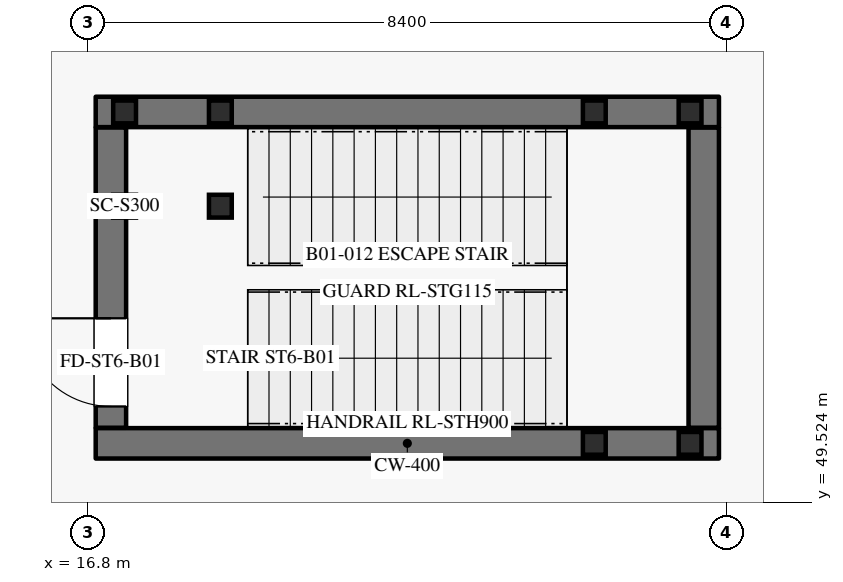
"""IFC4 building model, lengths in metres.
Left out: names, types, materials, properties, quantities, classifications, styles, units other than length and angle.
Written with IfcOpenShell. Run it as: python <this file> out.ifc"""

import sys

from ifc_helpers import new_model, si_unit, direction, frame, frame_2d, origin, origin_2d, place, context, subcontext, project, spatial, rectangle, hollow_rectangle, extrude, element, fill, save


model = new_model("IFC4")
c1 = context("Model", 3, precision=1e-05, world=origin(), true_north=direction((0.0, 1.0)))
c2 = subcontext(c1, "Body", "Model", "MODEL_VIEW")
j1 = project(units=[si_unit("LENGTHUNIT", "METRE"), si_unit("PLANEANGLEUNIT", "RADIAN")], contexts=[c1])
p1 = place(None, origin())
s1 = spatial("IfcSite", under=j1, at=p1, CompositionType="ELEMENT")
p2 = place(p1, origin())
s2 = spatial("IfcBuilding", under=s1, at=p2, CompositionType="ELEMENT")
p3 = place(p2, frame((0.0, 0.0, -5.4)))
s3 = spatial("IfcBuildingStorey", under=s2, at=p3, CompositionType="ELEMENT", Elevation=-5.4)
p4 = place(p3, frame((16.9, 50.3, 0.0), z_axis=(0.0, 0.0, 1.0), x_axis=(1.0, 0.0, 0.0)))
e1 = element("IfcWall", 1, at=p4, inside=s3, PredefinedType="SHEAR", context=c2, shape_type="SweptSolid", body=[
    extrude(rectangle(XDim=8.2, YDim=0.4, at=frame_2d((4.1, 0.0))), origin(), (0.0, 0.0, 1.0), 4.995),
])
p5 = place(p3, frame((24.9, 50.505, 0.0), z_axis=(0.0, 0.0, 1.0), x_axis=(0.0, 1.0, 0.0)))
e2 = element("IfcWall", 2, at=p5, inside=s3, PredefinedType="SHEAR", context=c2, shape_type="SweptSolid", body=[
    extrude(rectangle(XDim=3.95, YDim=0.4, at=frame_2d((1.975, 0.0))), origin(), (0.0, 0.0, 1.0), 4.995),
])
p6 = place(p3, frame((16.9, 54.66, 0.0), z_axis=(0.0, 0.0, 1.0), x_axis=(1.0, 0.0, 0.0)))
e3 = element("IfcWall", 3, at=p6, inside=s3, PredefinedType="SHEAR", context=c2, shape_type="SweptSolid", body=[
    extrude(rectangle(XDim=8.2, YDim=0.4, at=frame_2d((4.1, 0.0))), origin(), (0.0, 0.0, 1.0), 4.995),
])
p7 = place(p3, frame((17.1, 50.505, 0.0), z_axis=(0.0, 0.0, 1.0), x_axis=(0.0, 1.0, 0.0)))
e4 = element("IfcWall", 4, at=p7, inside=s3, PredefinedType="SHEAR", context=c2, shape_type="SweptSolid", body=[
    extrude(rectangle(XDim=3.95, YDim=0.4, at=frame_2d((1.975, 0.0))), origin(), (0.0, 0.0, 1.0), 4.995),
])
p8 = place(p7, frame((0.28, 0.0, 0.0)))
e5 = element("IfcOpeningElement", 5, at=p8, cuts=e4, PredefinedType="OPENING", context=c2, shape_type="SweptSolid", body=[
    extrude(rectangle(XDim=1.16, YDim=2.2, at=frame_2d((0.58, 1.1))), frame((0.0, 0.21, 0.0), z_axis=(0.0, -1.0, 0.0), x_axis=(1.0, 0.0, 0.0)), (0.0, 0.0, 1.0), 0.42),
])
for number, where, z_axis, x_axis in (
    (6, (17.28, 53.42, 0.0), (0.0, 0.0, 1.0), (1.0, 0.0, 0.0)),
    (7, (17.28, 54.66, 0.0), (0.0, 0.0, 1.0), (1.0, 0.0, 0.0)),
    (8, (18.54, 53.42, 0.0), (0.0, 0.0, 1.0), (1.0, 0.0, 0.0)),
    (9, (18.54, 54.66, 0.0), (0.0, 0.0, 1.0), (1.0, 0.0, 0.0)),
):
    element("IfcColumn", number, at=place(p3, frame(where, z_axis=z_axis, x_axis=x_axis)), inside=s3, PredefinedType="COLUMN", context=c2, shape_type="SweptSolid", body=[
        extrude(hollow_rectangle(XDim=0.3, YDim=0.3, WallThickness=0.012, at=origin_2d()), origin(), (0.0, 0.0, 1.0), 5.22),
    ])
for number, where, z_axis, x_axis in (
    (10, (23.46, 50.3, 0.0), (0.0, 0.0, 1.0), (1.0, 0.0, 0.0)),
    (11, (23.46, 54.66, 0.0), (0.0, 0.0, 1.0), (1.0, 0.0, 0.0)),
    (12, (24.72, 50.3, 0.0), (0.0, 0.0, 1.0), (1.0, 0.0, 0.0)),
    (13, (24.72, 54.66, 0.0), (0.0, 0.0, 1.0), (1.0, 0.0, 0.0)),
):
    element("IfcColumn", number, at=place(p3, frame(where, z_axis=z_axis, x_axis=x_axis)), inside=s3, PredefinedType="COLUMN", context=c2, shape_type="SweptSolid", body=[
        extrude(hollow_rectangle(XDim=0.3, YDim=0.3, WallThickness=0.012, at=origin_2d()), origin(), (0.0, 0.0, 1.0), 2.52),
    ])
p9 = place(p8, origin())
e14 = element("IfcDoor", 14, at=p9, inside=s3, OperationType="SINGLE_SWING_RIGHT", PredefinedType="DOOR", context=c2, shape_type="SweptSolid", body=[
    extrude(rectangle(XDim=1.16, YDim=2.2, at=frame_2d((0.58, 1.1))), frame((0.0, 0.025, 0.0), z_axis=(0.0, -1.0, 0.0), x_axis=(1.0, 0.0, 0.0)), (0.0, 0.0, 1.0), 0.05),
])
fill(e5, e14)
save(model, sys.argv[1])
